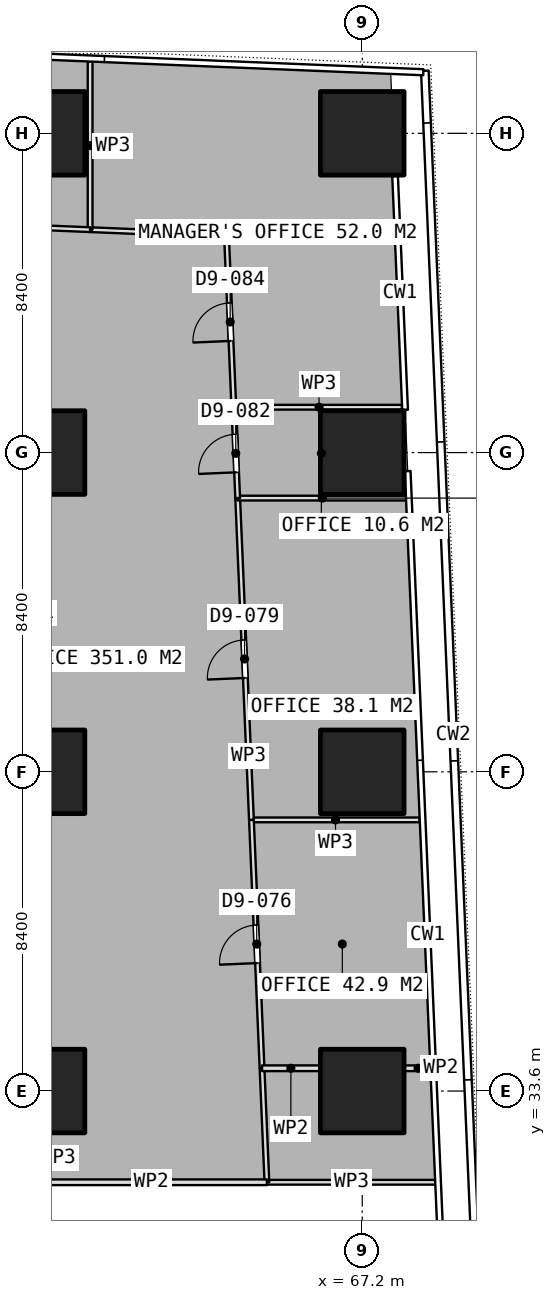
"""IFC4 building model, lengths in metres.
Left out: names, types, materials, properties, quantities, classifications, styles, units other than length and angle.
Written with IfcOpenShell. Run it as: python <this file> out.ifc"""

import sys

from ifc_helpers import new_model, si_unit, direction, frame, frame_2d, origin, origin_2d, place, context, subcontext, project, spatial, rectangle, extrude, element, fill, save


model = new_model("IFC4")
c1 = context("Model", 3, precision=1e-05, world=origin(), true_north=direction((0.0, 1.0)))
c2 = subcontext(c1, "Body", "Model", "MODEL_VIEW")
j1 = project(units=[si_unit("LENGTHUNIT", "METRE"), si_unit("PLANEANGLEUNIT", "RADIAN")], contexts=[c1])
p1 = place(None, origin())
s1 = spatial("IfcSite", under=j1, at=p1, CompositionType="ELEMENT")
p2 = place(p1, origin())
s2 = spatial("IfcBuilding", under=s1, at=p2, CompositionType="ELEMENT")
p3 = place(p2, frame((0.0, 0.0, 36.65)))
s3 = spatial("IfcBuildingStorey", under=s2, at=p3, CompositionType="ELEMENT", Elevation=36.65)
for number, where, z_axis, x_axis in (
    (1, (58.8, 33.6, 0.0), (0.0, 0.0, 1.0), (1.0, 0.0, 0.0)),
    (2, (58.8, 42.0, 0.0), (0.0, 0.0, 1.0), (1.0, 0.0, 0.0)),
    (3, (58.8, 50.4, 0.0), (0.0, 0.0, 1.0), (1.0, 0.0, 0.0)),
    (4, (58.8, 58.8, 0.0), (0.0, 0.0, 1.0), (1.0, 0.0, 0.0)),
    (5, (67.2, 33.6, 0.0), (0.0, 0.0, 1.0), (1.0, 0.0, 0.0)),
    (6, (67.2, 42.0, 0.0), (0.0, 0.0, 1.0), (1.0, 0.0, 0.0)),
    (7, (67.2, 50.4, 0.0), (0.0, 0.0, 1.0), (1.0, 0.0, 0.0)),
    (8, (67.2, 58.8, 0.0), (0.0, 0.0, 1.0), (1.0, 0.0, 0.0)),
):
    element("IfcColumn", number, at=place(p3, frame(where, z_axis=z_axis, x_axis=x_axis)), inside=s3, PredefinedType="COLUMN", context=c2, shape_type="SweptSolid", body=[
        extrude(rectangle(XDim=2.2, YDim=2.2, at=origin_2d()), origin(), (0.0, 0.0, 1.0), 3.75),
    ])
p4 = place(p3, frame((64.284, 40.735, 0.0), z_axis=(0.0, 0.0, 1.0), x_axis=(1.0, 0.0, 0.0)))
e9 = element("IfcWall", 9, at=p4, inside=s3, PredefinedType="PARTITIONING", context=c2, shape_type="SweptSolid", body=[
    extrude(rectangle(XDim=4.424, YDim=0.125, at=frame_2d((2.212, 0.0))), origin(), (0.0, 0.0, 1.0), 3.5),
])
p5 = place(p3, frame((69.145, 31.2, 0.0), z_axis=(0.0, 0.0, 1.0), x_axis=(-1.0, 0.0, 0.0)))
e10 = element("IfcWall", 10, at=p5, inside=s3, PredefinedType="PARTITIONING", context=c2, shape_type="SweptSolid", body=[
    extrude(rectangle(XDim=4.454, YDim=0.125, at=frame_2d((2.227, 0.0))), origin(), (0.0, 0.0, 1.0), 3.5),
])
p6 = place(p3, frame((64.691, 31.2, 0.0), z_axis=(0.0, 0.0, 1.0), x_axis=(-0.042604509782, 0.999092015655, 0.0)))
e11 = element("IfcWall", 11, at=p6, inside=s3, PredefinedType="PARTITIONING", context=c2, shape_type="SweptSolid", body=[
    extrude(rectangle(XDim=3.003, YDim=0.125, at=frame_2d((1.501, 0.0))), origin(), (0.0, 0.0, 1.0), 3.5),
])
p7 = place(p3, frame((64.563, 34.2, 0.0), z_axis=(0.0, 0.0, 1.0), x_axis=(-0.042661364349, 0.999089589572, 0.0)))
e12 = element("IfcWall", 12, at=p7, inside=s3, PredefinedType="PARTITIONING", context=c2, shape_type="SweptSolid", body=[
    extrude(rectangle(XDim=6.541, YDim=0.125, at=frame_2d((3.271, 0.0))), origin(), (0.0, 0.0, 1.0), 3.5),
])
p8 = place(p7, frame((2.77, 0.0, 0.0)))
e13 = element("IfcOpeningElement", 13, at=p8, cuts=e12, PredefinedType="OPENING", context=c2, shape_type="SweptSolid", body=[
    extrude(rectangle(XDim=1.0, YDim=2.1, at=frame_2d((0.5, 1.05))), frame((0.0, 0.073, 0.0), z_axis=(0.0, -1.0, 0.0), x_axis=(1.0, 0.0, 0.0)), (0.0, 0.0, 1.0), 0.145),
])
p9 = place(p3, frame((64.284, 40.736, 0.0), z_axis=(0.0, 0.0, 1.0), x_axis=(-0.04269951426, 0.999087959832, 0.0)))
e14 = element("IfcWall", 14, at=p9, inside=s3, PredefinedType="PARTITIONING", context=c2, shape_type="SweptSolid", body=[
    extrude(rectangle(XDim=8.474, YDim=0.125, at=frame_2d((4.237, 0.0))), origin(), (0.0, 0.0, 1.0), 3.5),
])
p10 = place(p9, frame((3.737, 0.0, 0.0)))
e15 = element("IfcOpeningElement", 15, at=p10, cuts=e14, PredefinedType="OPENING", context=c2, shape_type="SweptSolid", body=[
    extrude(rectangle(XDim=1.0, YDim=2.1, at=frame_2d((0.5, 1.05))), frame((0.0, 0.073, 0.0), z_axis=(0.0, -1.0, 0.0), x_axis=(1.0, 0.0, 0.0)), (0.0, 0.0, 1.0), 0.145),
])
p11 = place(p3, frame((63.922, 49.202, 0.0), z_axis=(0.0, 0.0, 1.0), x_axis=(1.0, 0.0, 0.0)))
e16 = element("IfcWall", 16, at=p11, inside=s3, PredefinedType="PARTITIONING", context=c2, shape_type="SweptSolid", body=[
    extrude(rectangle(XDim=4.454, YDim=0.125, at=frame_2d((2.227, 0.0))), origin(), (0.0, 0.0, 1.0), 3.5),
])
p12 = place(p3, frame((63.922, 49.203, 0.0), z_axis=(0.0, 0.0, 1.0), x_axis=(-0.042501507067, 0.999096402704, 0.0)))
e17 = element("IfcWall", 17, at=p12, inside=s3, PredefinedType="PARTITIONING", context=c2, shape_type="SweptSolid", body=[
    extrude(rectangle(XDim=2.355, YDim=0.125, at=frame_2d((1.178, 0.0))), origin(), (0.0, 0.0, 1.0), 3.5),
])
p13 = place(p12, frame((0.678, 0.0, 0.0)))
e18 = element("IfcOpeningElement", 18, at=p13, cuts=e17, PredefinedType="OPENING", context=c2, shape_type="SweptSolid", body=[
    extrude(rectangle(XDim=1.0, YDim=2.1, at=frame_2d((0.5, 1.05))), frame((0.0, 0.073, 0.0), z_axis=(0.0, -1.0, 0.0), x_axis=(1.0, 0.0, 0.0)), (0.0, 0.0, 1.0), 0.145),
])
p14 = place(p3, frame((63.883, 51.593, 0.0), z_axis=(0.0, 0.0, 1.0), x_axis=(1.0, 0.0, 0.0)))
e19 = element("IfcWall", 19, at=p14, inside=s3, PredefinedType="PARTITIONING", context=c2, shape_type="SweptSolid", body=[
    extrude(rectangle(XDim=4.361, YDim=0.125, at=frame_2d((2.18, 0.0))), origin(), (0.0, 0.0, 1.0), 3.5),
])
p15 = place(p3, frame((63.822, 51.557, 0.0), z_axis=(0.0, 0.0, 1.0), x_axis=(-0.042738513094, 0.999086292318, 0.0)))
e20 = element("IfcWall", 20, at=p15, inside=s3, PredefinedType="PARTITIONING", context=c2, shape_type="SweptSolid", body=[
    extrude(rectangle(XDim=4.564, YDim=0.125, at=frame_2d((2.282, 0.0))), origin(), (0.0, 0.0, 1.0), 3.5),
])
p16 = place(p15, frame((1.782, 0.0, 0.0)))
e21 = element("IfcOpeningElement", 21, at=p16, cuts=e20, PredefinedType="OPENING", context=c2, shape_type="SweptSolid", body=[
    extrude(rectangle(XDim=1.0, YDim=2.1, at=frame_2d((0.5, 1.05))), frame((0.0, 0.073, 0.0), z_axis=(0.0, -1.0, 0.0), x_axis=(1.0, 0.0, 0.0)), (0.0, 0.0, 1.0), 0.145),
])
p17 = place(p3, frame((63.627, 56.117, 0.0), z_axis=(0.0, 0.0, 1.0), x_axis=(-0.999150890799, 0.041200696776, 0.0)))
e22 = element("IfcWall", 22, at=p17, inside=s3, PredefinedType="PARTITIONING", context=c2, shape_type="SweptSolid", body=[
    extrude(rectangle(XDim=3.591, YDim=0.125, at=frame_2d((1.795, 0.0))), origin(), (0.0, 0.0, 1.0), 3.5),
])
p18 = place(p3, frame((60.039, 56.265, 0.0), z_axis=(0.0, 0.0, 1.0), x_axis=(0.0, 1.0, 0.0)))
e23 = element("IfcWall", 23, at=p18, inside=s3, PredefinedType="PARTITIONING", context=c2, shape_type="SweptSolid", body=[
    extrude(rectangle(XDim=4.424, YDim=0.125, at=frame_2d((2.212, 0.0))), origin(), (0.0, 0.0, 1.0), 3.5),
])
p19 = place(p3, frame((60.038, 56.265, 0.0), z_axis=(0.0, 0.0, 1.0), x_axis=(-0.999150321127, 0.041214509478, 0.0)))
e24 = element("IfcWall", 24, at=p19, inside=s3, PredefinedType="PARTITIONING", context=c2, shape_type="SweptSolid", body=[
    extrude(rectangle(XDim=8.299, YDim=0.125, at=frame_2d((4.149, 0.0))), origin(), (0.0, 0.0, 1.0), 3.5),
])
p20 = place(p19, frame((3.65, 0.0, 0.0)))
e25 = element("IfcOpeningElement", 25, at=p20, cuts=e24, PredefinedType="OPENING", context=c2, shape_type="SweptSolid", body=[
    extrude(rectangle(XDim=1.0, YDim=2.1, at=frame_2d((0.5, 1.05))), frame((0.0, 0.073, 0.0), z_axis=(0.0, -1.0, 0.0), x_axis=(1.0, 0.0, 0.0)), (0.0, 0.0, 1.0), 0.145),
])
p21 = place(p3, frame((69.017, 34.2, 0.0), z_axis=(0.0, 0.0, 1.0), x_axis=(-1.0, 0.0, 0.0)))
e26 = element("IfcWall", 26, at=p21, inside=s3, PredefinedType="PARTITIONING", context=c2, shape_type="SweptSolid", body=[
    extrude(rectangle(XDim=0.697, YDim=0.15, at=frame_2d((0.349, 0.0))), origin(), (0.0, 0.0, 1.0), 3.5),
])
p22 = place(p3, frame((66.08, 34.2, 0.0), z_axis=(0.0, 0.0, 1.0), x_axis=(-1.0, 0.0, 0.0)))
e27 = element("IfcWall", 27, at=p22, inside=s3, PredefinedType="PARTITIONING", context=c2, shape_type="SweptSolid", body=[
    extrude(rectangle(XDim=1.517, YDim=0.15, at=frame_2d((0.759, 0.0))), origin(), (0.0, 0.0, 1.0), 3.5),
])
p23 = place(p3, frame((64.691, 31.2, 0.0), z_axis=(0.0, 0.0, 1.0), x_axis=(-1.0, 0.0, 0.0)))
e28 = element("IfcWall", 28, at=p23, inside=s3, PredefinedType="PARTITIONING", context=c2, shape_type="SweptSolid", body=[
    extrude(rectangle(XDim=6.091, YDim=0.15, at=frame_2d((3.045, 0.0))), origin(), (0.0, 0.0, 1.0), 3.5),
])
p24 = place(p8, origin())
e29 = element("IfcDoor", 29, at=p24, inside=s3, OperationType="SINGLE_SWING_LEFT", PredefinedType="DOOR", context=c2, shape_type="SweptSolid", body=[
    extrude(rectangle(XDim=1.0, YDim=2.1, at=frame_2d((0.5, 1.05))), frame((0.0, 0.025, 0.0), z_axis=(0.0, -1.0, 0.0), x_axis=(1.0, 0.0, 0.0)), (0.0, 0.0, 1.0), 0.05),
])
fill(e13, e29)
p25 = place(p10, origin())
e30 = element("IfcDoor", 30, at=p25, inside=s3, OperationType="SINGLE_SWING_LEFT", PredefinedType="DOOR", context=c2, shape_type="SweptSolid", body=[
    extrude(rectangle(XDim=1.0, YDim=2.1, at=frame_2d((0.5, 1.05))), frame((0.0, 0.025, 0.0), z_axis=(0.0, -1.0, 0.0), x_axis=(1.0, 0.0, 0.0)), (0.0, 0.0, 1.0), 0.05),
])
fill(e15, e30)
p26 = place(p13, origin())
e31 = element("IfcDoor", 31, at=p26, inside=s3, OperationType="SINGLE_SWING_LEFT", PredefinedType="DOOR", context=c2, shape_type="SweptSolid", body=[
    extrude(rectangle(XDim=1.0, YDim=2.1, at=frame_2d((0.5, 1.05))), frame((0.0, 0.025, 0.0), z_axis=(0.0, -1.0, 0.0), x_axis=(1.0, 0.0, 0.0)), (0.0, 0.0, 1.0), 0.05),
])
fill(e18, e31)
p27 = place(p16, origin())
e32 = element("IfcDoor", 32, at=p27, inside=s3, OperationType="SINGLE_SWING_LEFT", PredefinedType="DOOR", context=c2, shape_type="SweptSolid", body=[
    extrude(rectangle(XDim=1.0, YDim=2.1, at=frame_2d((0.5, 1.05))), frame((0.0, 0.025, 0.0), z_axis=(0.0, -1.0, 0.0), x_axis=(1.0, 0.0, 0.0)), (0.0, 0.0, 1.0), 0.05),
])
fill(e21, e32)
save(model, sys.argv[1])
